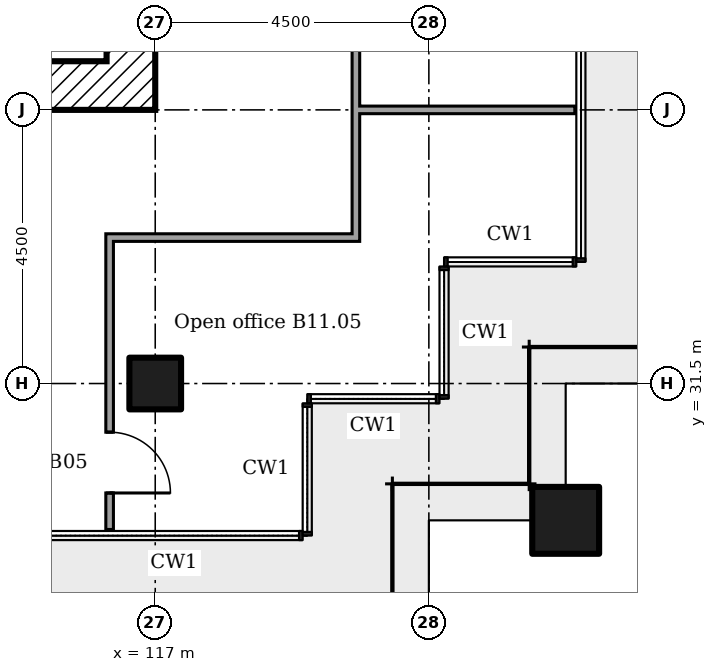
"""IFC4 building model, lengths in metres.
Left out: names, types, materials, properties, quantities, classifications, styles, units other than length and angle.
Written with IfcOpenShell. Run it as: python <this file> out.ifc"""

import sys

from ifc_helpers import new_model, si_unit, direction, frame, frame_2d, origin, origin_2d, place, context, subcontext, project, spatial, rectangle, extrude, element, fill, save


model = new_model("IFC4")
c1 = context("Model", 3, precision=1e-05, world=origin(), true_north=direction((0.0, 1.0)))
c2 = subcontext(c1, "Body", "Model", "MODEL_VIEW")
j1 = project(units=[si_unit("LENGTHUNIT", "METRE"), si_unit("PLANEANGLEUNIT", "RADIAN")], contexts=[c1])
p1 = place(None, origin())
s1 = spatial("IfcSite", under=j1, at=p1, CompositionType="ELEMENT")
p2 = place(p1, origin())
s2 = spatial("IfcBuilding", under=s1, at=p2, CompositionType="ELEMENT")
p3 = place(p2, frame((0.0, 0.0, 51.0)))
s3 = spatial("IfcBuildingStorey", under=s2, at=p3, CompositionType="ELEMENT", Elevation=51.0)
p4 = place(p3, frame((123.75, 29.25, 0.0)))
e1 = element("IfcColumn", 1, at=p4, inside=s3, PredefinedType="COLUMN", context=c2, shape_type="SweptSolid", body=[
    extrude(rectangle(XDim=1.1, YDim=1.1, at=origin_2d()), origin(), (0.0, 0.0, 1.0), 3.6),
])
p5 = place(p3, frame((117.0, 31.5, 0.0)))
e2 = element("IfcColumn", 2, at=p5, inside=s3, PredefinedType="COLUMN", context=c2, shape_type="SweptSolid", body=[
    extrude(rectangle(XDim=0.85, YDim=0.85, at=origin_2d()), origin(), (0.0, 0.0, 1.0), 3.6),
])
p6 = place(p3, frame((116.6, 36.0, 0.0), z_axis=(0.0, 0.0, 1.0), x_axis=(0.0, 1.0, 0.0)))
e3 = element("IfcWall", 3, at=p6, inside=s3, PredefinedType="SHEAR", context=c2, shape_type="SweptSolid", body=[
    extrude(rectangle(XDim=13.5, YDim=0.8, at=frame_2d((6.75, 0.0))), origin(), (0.0, 0.0, 1.0), 3.35),
])
p7 = place(p6, frame((3.7, 0.0, 0.0)))
e4 = element("IfcOpeningElement", 4, at=p7, cuts=e3, PredefinedType="OPENING", context=c2, shape_type="SweptSolid", body=[
    extrude(rectangle(XDim=1.2, YDim=2.1, at=frame_2d((0.6, 1.05))), frame((0.0, 0.41, 0.0), z_axis=(0.0, -1.0, 0.0), x_axis=(1.0, 0.0, 0.0)), (0.0, 0.0, 1.0), 0.82),
])
p8 = place(p6, frame((6.275, 0.0, 0.0)))
e5 = element("IfcOpeningElement", 5, at=p8, cuts=e3, PredefinedType="OPENING", context=c2, shape_type="SweptSolid", body=[
    extrude(rectangle(XDim=1.0, YDim=2.1, at=frame_2d((0.5, 1.05))), frame((0.0, 0.41, 0.0), z_axis=(0.0, -1.0, 0.0), x_axis=(1.0, 0.0, 0.0)), (0.0, 0.0, 1.0), 0.82),
])
p9 = place(p3, frame((104.3, 36.4, 0.0)))
e6 = element("IfcWall", 6, at=p9, inside=s3, PredefinedType="SHEAR", context=c2, shape_type="SweptSolid", body=[
    extrude(rectangle(XDim=11.9, YDim=0.8, at=frame_2d((5.95, 0.0))), origin(), (0.0, 0.0, 1.0), 3.35),
])
p10 = place(p3, frame((116.188, 33.9, 0.0)))
e7 = element("IfcWall", 7, at=p10, inside=s3, PredefinedType="PARTITIONING", context=c2, shape_type="SweptSolid", body=[
    extrude(rectangle(XDim=4.175, YDim=0.125, at=frame_2d((2.087, 0.0))), origin(), (0.0, 0.0, 1.0), 3.45),
])
p11 = place(p3, frame((120.3, 36.0, 0.0)))
e8 = element("IfcWall", 8, at=p11, inside=s3, PredefinedType="PARTITIONING", context=c2, shape_type="SweptSolid", body=[
    extrude(rectangle(XDim=3.6, YDim=0.125, at=frame_2d((1.8, 0.0))), origin(), (0.0, 0.0, 1.0), 2.851),
])
p12 = place(p3, frame((116.25, 29.1, 0.0), z_axis=(0.0, 0.0, 1.0), x_axis=(0.0, 1.0, 0.0)))
e9 = element("IfcWall", 9, at=p12, inside=s3, PredefinedType="PARTITIONING", context=c2, shape_type="SweptSolid", body=[
    extrude(rectangle(XDim=4.737, YDim=0.125, at=frame_2d((2.369, 0.0))), origin(), (0.0, 0.0, 1.0), 3.45),
])
p13 = place(p12, frame((0.6, 0.0, 0.0)))
e10 = element("IfcOpeningElement", 10, at=p13, cuts=e9, PredefinedType="OPENING", context=c2, shape_type="SweptSolid", body=[
    extrude(rectangle(XDim=1.0, YDim=2.1, at=frame_2d((0.5, 1.05))), frame((0.0, 0.073, 0.0), z_axis=(0.0, -1.0, 0.0), x_axis=(1.0, 0.0, 0.0)), (0.0, 0.0, 1.0), 0.145),
])
p14 = place(p3, frame((120.3, 33.962, 0.0), z_axis=(0.0, 0.0, 1.0), x_axis=(0.0, 1.0, 0.0)))
e11 = element("IfcWall", 11, at=p14, inside=s3, PredefinedType="PARTITIONING", context=c2, shape_type="SweptSolid", body=[
    extrude(rectangle(XDim=18.175, YDim=0.125, at=frame_2d((9.087, 0.0))), origin(), (0.0, 0.0, 1.0), 3.45),
])
p15 = place(p14, frame((7.28, 0.0, 0.0)))
e12 = element("IfcOpeningElement", 12, at=p15, cuts=e11, PredefinedType="OPENING", context=c2, shape_type="SweptSolid", body=[
    extrude(rectangle(XDim=1.0, YDim=2.1, at=frame_2d((0.5, 1.05))), frame((0.0, 0.073, 0.0), z_axis=(0.0, -1.0, 0.0), x_axis=(1.0, 0.0, 0.0)), (0.0, 0.0, 1.0), 0.145),
])
p16 = place(p14, frame((12.788, 0.0, 0.0)))
e13 = element("IfcOpeningElement", 13, at=p16, cuts=e11, PredefinedType="OPENING", context=c2, shape_type="SweptSolid", body=[
    extrude(rectangle(XDim=1.0, YDim=2.1, at=frame_2d((0.5, 1.05))), frame((0.0, 0.073, 0.0), z_axis=(0.0, -1.0, 0.0), x_axis=(1.0, 0.0, 0.0)), (0.0, 0.0, 1.0), 0.145),
])
p17 = place(p14, frame((16.248, 0.0, 0.0)))
e14 = element("IfcOpeningElement", 14, at=p17, cuts=e11, PredefinedType="OPENING", context=c2, shape_type="SweptSolid", body=[
    extrude(rectangle(XDim=1.0, YDim=2.1, at=frame_2d((0.5, 1.05))), frame((0.0, 0.073, 0.0), z_axis=(0.0, -1.0, 0.0), x_axis=(1.0, 0.0, 0.0)), (0.0, 0.0, 1.0), 0.145),
])
p18 = place(p13, frame((1.0, 0.0, 0.0), x_axis=(-1.0, 0.0, 0.0)))
e15 = element("IfcDoor", 15, at=p18, inside=s3, OperationType="SINGLE_SWING_LEFT", PredefinedType="DOOR", context=c2, shape_type="SweptSolid", body=[
    extrude(rectangle(XDim=1.0, YDim=2.1, at=frame_2d((0.5, 1.05))), frame((0.0, 0.025, 0.0), z_axis=(0.0, -1.0, 0.0), x_axis=(1.0, 0.0, 0.0)), (0.0, 0.0, 1.0), 0.05),
])
fill(e10, e15)
save(model, sys.argv[1])
